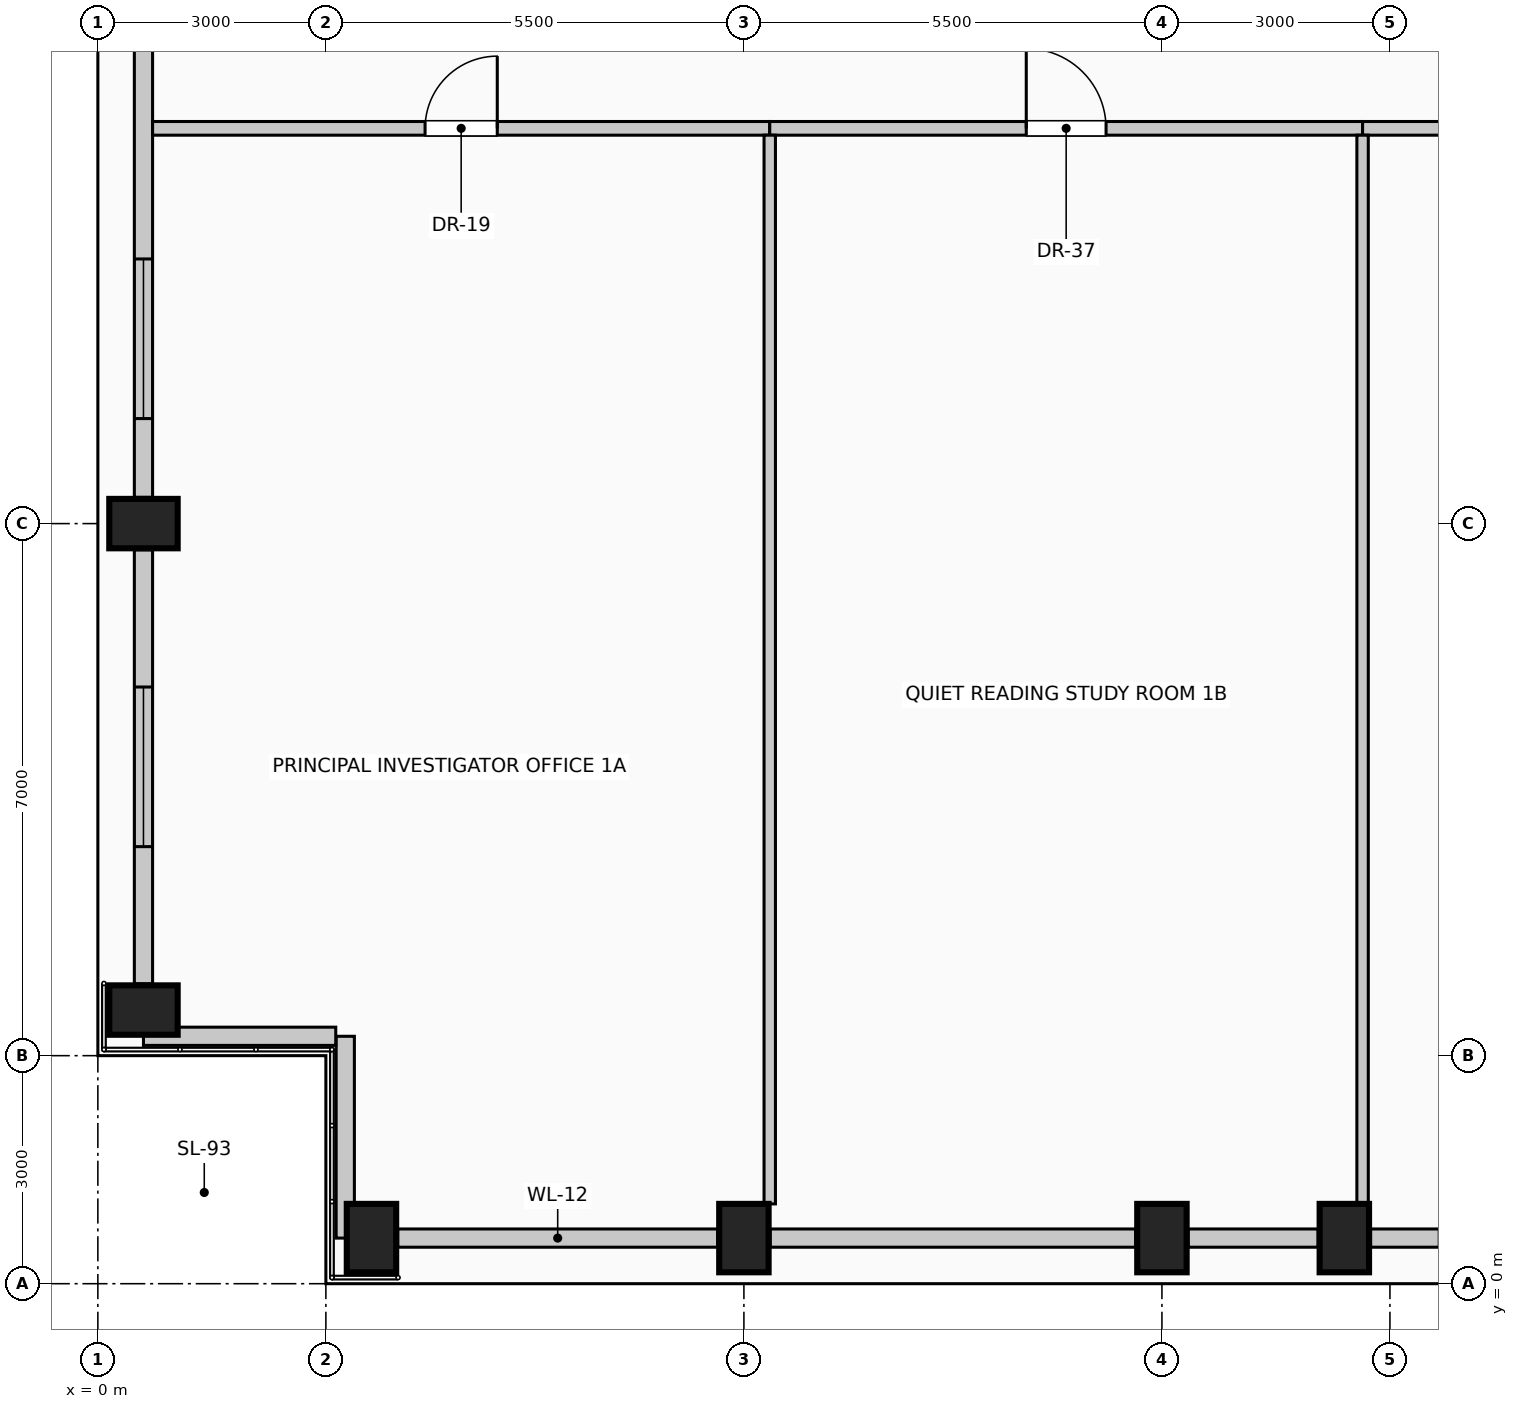
"""IFC4 building model, lengths in metres.
Left out: names, types, materials, properties, quantities, classifications, styles, units other than length and angle.
Written with IfcOpenShell. Run it as: python <this file> out.ifc"""

import sys

from ifc_helpers import new_model, si_unit, direction, frame, frame_2d, origin, origin_2d, place, context, subcontext, project, spatial, rectangle, extrude, element, fill, save


model = new_model("IFC4")
c1 = context("Model", 3, precision=1e-05, world=origin(), true_north=direction((0.0, 1.0)))
c2 = subcontext(c1, "Body", "Model", "MODEL_VIEW")
j1 = project(units=[si_unit("LENGTHUNIT", "METRE"), si_unit("PLANEANGLEUNIT", "RADIAN")], contexts=[c1])
p1 = place(None, origin())
s1 = spatial("IfcSite", under=j1, at=p1, CompositionType="ELEMENT")
p2 = place(p1, origin())
s2 = spatial("IfcBuilding", under=s1, at=p2, CompositionType="ELEMENT")
p3 = place(p2, frame((0.0, 0.0, 293.0)))
s3 = spatial("IfcBuildingStorey", under=s2, at=p3, CompositionType="ELEMENT", Elevation=293.0)
for number, where, z_axis, x_axis in (
    (1, (3.6, 0.6, 0.0), (0.0, 0.0, 1.0), (1.0, 0.0, 0.0)),
    (2, (8.5, 0.6, 0.0), (0.0, 0.0, 1.0), (1.0, 0.0, 0.0)),
    (3, (14.0, 0.6, 0.0), (0.0, 0.0, 1.0), (1.0, 0.0, 0.0)),
    (4, (16.4, 0.6, 0.0), (0.0, 0.0, 1.0), (1.0, 0.0, 0.0)),
    (5, (0.6, 3.6, 0.0), (0.0, 0.0, 1.0), (0.0, 1.0, 0.0)),
    (6, (0.6, 10.0, 0.0), (0.0, 0.0, 1.0), (0.0, 1.0, 0.0)),
):
    element("IfcColumn", number, at=place(p3, frame(where, z_axis=z_axis, x_axis=x_axis)), inside=s3, PredefinedType="COLUMN", context=c2, shape_type="SweptSolid", body=[
        extrude(rectangle(XDim=0.65, YDim=0.9, at=origin_2d()), origin(), (0.0, 0.0, 1.0), 4.0),
    ])
p4 = place(p3, frame((8.155, 0.6, 0.0), z_axis=(0.0, 0.0, 1.0), x_axis=(-1.0, 0.0, 0.0)))
e7 = element("IfcWall", 7, at=p4, inside=s3, PredefinedType="SOLIDWALL", context=c2, shape_type="SweptSolid", body=[
    extrude(rectangle(XDim=4.21, YDim=0.24, at=frame_2d((2.105, 0.0))), origin(), (0.0, 0.0, 1.0), 3.025),
])
p5 = place(p3, frame((13.655, 0.6, 0.0), z_axis=(0.0, 0.0, 1.0), x_axis=(-1.0, 0.0, 0.0)))
e8 = element("IfcWall", 8, at=p5, inside=s3, PredefinedType="SOLIDWALL", context=c2, shape_type="SweptSolid", body=[
    extrude(rectangle(XDim=4.81, YDim=0.24, at=frame_2d((2.405, 0.0))), origin(), (0.0, 0.0, 1.0), 3.025),
])
p6 = place(p3, frame((16.055, 0.6, 0.0), z_axis=(0.0, 0.0, 1.0), x_axis=(-1.0, 0.0, 0.0)))
e9 = element("IfcWall", 9, at=p6, inside=s3, PredefinedType="SOLIDWALL", context=c2, shape_type="SweptSolid", body=[
    extrude(rectangle(XDim=1.71, YDim=0.24, at=frame_2d((0.855, 0.0))), origin(), (0.0, 0.0, 1.0), 3.025),
])
p7 = place(p3, frame((23.655, 0.6, 0.0), z_axis=(0.0, 0.0, 1.0), x_axis=(-1.0, 0.0, 0.0)))
e10 = element("IfcWall", 10, at=p7, inside=s3, PredefinedType="SOLIDWALL", context=c2, shape_type="SweptSolid", body=[
    extrude(rectangle(XDim=6.91, YDim=0.24, at=frame_2d((3.455, 0.0))), origin(), (0.0, 0.0, 1.0), 3.025),
])
p8 = place(p7, frame((3.907, 0.0, 0.35)))
e11 = element("IfcOpeningElement", 11, at=p8, cuts=e10, PredefinedType="OPENING", context=c2, shape_type="SweptSolid", body=[
    extrude(rectangle(XDim=2.1, YDim=2.2, at=frame_2d((1.05, 1.1))), frame((0.0, 0.13, 0.0), z_axis=(0.0, -1.0, 0.0), x_axis=(1.0, 0.0, 0.0)), (0.0, 0.0, 1.0), 0.26),
])
p9 = place(p3, frame((0.6, 3.945, 0.0), z_axis=(0.0, 0.0, 1.0), x_axis=(0.0, 1.0, 0.0)))
e12 = element("IfcWall", 12, at=p9, inside=s3, PredefinedType="SOLIDWALL", context=c2, shape_type="SweptSolid", body=[
    extrude(rectangle(XDim=5.71, YDim=0.24, at=frame_2d((2.855, 0.0))), origin(), (0.0, 0.0, 1.0), 3.025),
])
p10 = place(p9, frame((1.805, 0.0, 0.35)))
e13 = element("IfcOpeningElement", 13, at=p10, cuts=e12, PredefinedType="OPENING", context=c2, shape_type="SweptSolid", body=[
    extrude(rectangle(XDim=2.1, YDim=2.2, at=frame_2d((1.05, 1.1))), frame((0.0, 0.13, 0.0), z_axis=(0.0, -1.0, 0.0), x_axis=(1.0, 0.0, 0.0)), (0.0, 0.0, 1.0), 0.26),
])
p11 = place(p3, frame((0.6, 10.345, 0.0), z_axis=(0.0, 0.0, 1.0), x_axis=(0.0, 1.0, 0.0)))
e14 = element("IfcWall", 14, at=p11, inside=s3, PredefinedType="SOLIDWALL", context=c2, shape_type="SweptSolid", body=[
    extrude(rectangle(XDim=7.31, YDim=0.24, at=frame_2d((3.655, 0.0))), origin(), (0.0, 0.0, 1.0), 3.025),
])
p12 = place(p11, frame((1.037, 0.0, 0.35)))
e15 = element("IfcOpeningElement", 15, at=p12, cuts=e14, PredefinedType="OPENING", context=c2, shape_type="SweptSolid", body=[
    extrude(rectangle(XDim=2.1, YDim=2.2, at=frame_2d((1.05, 1.1))), frame((0.0, 0.13, 0.0), z_axis=(0.0, -1.0, 0.0), x_axis=(1.0, 0.0, 0.0)), (0.0, 0.0, 1.0), 0.26),
])
p13 = place(p3, frame((3.255, 0.6, 0.0), z_axis=(0.0, 0.0, 1.0), x_axis=(0.0, 1.0, 0.0)))
e16 = element("IfcWall", 16, at=p13, inside=s3, PredefinedType="SOLIDWALL", context=c2, shape_type="SweptSolid", body=[
    extrude(rectangle(XDim=2.655, YDim=0.24, at=frame_2d((1.327, 0.0))), origin(), (0.0, 0.0, 1.0), 3.775),
])
p14 = place(p3, frame((3.13, 3.255, 0.0), z_axis=(0.0, 0.0, 1.0), x_axis=(-1.0, 0.0, 0.0)))
e17 = element("IfcWall", 17, at=p14, inside=s3, PredefinedType="SOLIDWALL", context=c2, shape_type="SweptSolid", body=[
    extrude(rectangle(XDim=2.53, YDim=0.24, at=frame_2d((1.265, 0.0))), origin(), (0.0, 0.0, 1.0), 3.775),
])
p15 = place(p3, frame((0.72, 15.2, 0.0), z_axis=(0.0, 0.0, 1.0), x_axis=(1.0, 0.0, 0.0)))
e18 = element("IfcWall", 18, at=p15, inside=s3, PredefinedType="PARTITIONING", context=c2, shape_type="SweptSolid", body=[
    extrude(rectangle(XDim=8.12, YDim=0.18, at=frame_2d((4.06, 0.0))), origin(), (0.0, 0.0, 1.0), 3.775),
])
p16 = place(p15, frame((3.585, 0.0, 0.0)))
e19 = element("IfcOpeningElement", 19, at=p16, cuts=e18, PredefinedType="OPENING", context=c2, shape_type="SweptSolid", body=[
    extrude(rectangle(XDim=0.95, YDim=2.15, at=frame_2d((0.475, 1.075))), frame((0.0, 0.1, 0.0), z_axis=(0.0, -1.0, 0.0), x_axis=(1.0, 0.0, 0.0)), (0.0, 0.0, 1.0), 0.2),
])
p17 = place(p3, frame((8.84, 15.2, 0.0), z_axis=(0.0, 0.0, 1.0), x_axis=(1.0, 0.0, 0.0)))
e20 = element("IfcWall", 20, at=p17, inside=s3, PredefinedType="PARTITIONING", context=c2, shape_type="SweptSolid", body=[
    extrude(rectangle(XDim=7.8, YDim=0.18, at=frame_2d((3.9, 0.0))), origin(), (0.0, 0.0, 1.0), 3.775),
])
p18 = place(p17, frame((3.375, 0.0, 0.0)))
e21 = element("IfcOpeningElement", 21, at=p18, cuts=e20, PredefinedType="OPENING", context=c2, shape_type="SweptSolid", body=[
    extrude(rectangle(XDim=1.05, YDim=2.15, at=frame_2d((0.525, 1.075))), frame((0.0, 0.1, 0.0), z_axis=(0.0, -1.0, 0.0), x_axis=(1.0, 0.0, 0.0)), (0.0, 0.0, 1.0), 0.2),
])
p19 = place(p3, frame((16.64, 15.2, 0.0), z_axis=(0.0, 0.0, 1.0), x_axis=(1.0, 0.0, 0.0)))
e22 = element("IfcWall", 22, at=p19, inside=s3, PredefinedType="PARTITIONING", context=c2, shape_type="SweptSolid", body=[
    extrude(rectangle(XDim=6.46, YDim=0.18, at=frame_2d((3.23, 0.0))), origin(), (0.0, 0.0, 1.0), 3.775),
])
p20 = place(p19, frame((2.755, 0.0, 0.0)))
e23 = element("IfcOpeningElement", 23, at=p20, cuts=e22, PredefinedType="OPENING", context=c2, shape_type="SweptSolid", body=[
    extrude(rectangle(XDim=0.95, YDim=2.15, at=frame_2d((0.475, 1.075))), frame((0.0, 0.1, 0.0), z_axis=(0.0, -1.0, 0.0), x_axis=(1.0, 0.0, 0.0)), (0.0, 0.0, 1.0), 0.2),
])
p21 = place(p3, frame((8.84, 1.05, 0.0), z_axis=(0.0, 0.0, 1.0), x_axis=(0.0, 1.0, 0.0)))
e24 = element("IfcWall", 24, at=p21, inside=s3, PredefinedType="PARTITIONING", context=c2, shape_type="SweptSolid", body=[
    extrude(rectangle(XDim=14.06, YDim=0.15, at=frame_2d((7.03, 0.0))), origin(), (0.0, 0.0, 1.0), 3.775),
])
p22 = place(p3, frame((16.64, 1.05, 0.0), z_axis=(0.0, 0.0, 1.0), x_axis=(0.0, 1.0, 0.0)))
e25 = element("IfcWall", 25, at=p22, inside=s3, PredefinedType="PARTITIONING", context=c2, shape_type="SweptSolid", body=[
    extrude(rectangle(XDim=14.06, YDim=0.15, at=frame_2d((7.03, 0.0))), origin(), (0.0, 0.0, 1.0), 3.27),
])
p23 = place(p10, origin())
e26 = element("IfcWindow", 26, at=p23, inside=s3, PartitioningType="SINGLE_PANEL", PredefinedType="WINDOW", context=c2, shape_type="SweptSolid", body=[
    extrude(rectangle(XDim=2.1, YDim=2.2, at=frame_2d((1.05, 1.1))), frame((0.0, 0.03, 0.0), z_axis=(0.0, -1.0, 0.0), x_axis=(1.0, 0.0, 0.0)), (0.0, 0.0, 1.0), 0.06),
])
fill(e13, e26)
p24 = place(p12, origin())
e27 = element("IfcWindow", 27, at=p24, inside=s3, PartitioningType="SINGLE_PANEL", PredefinedType="WINDOW", context=c2, shape_type="SweptSolid", body=[
    extrude(rectangle(XDim=2.1, YDim=2.2, at=frame_2d((1.05, 1.1))), frame((0.0, 0.03, 0.0), z_axis=(0.0, -1.0, 0.0), x_axis=(1.0, 0.0, 0.0)), (0.0, 0.0, 1.0), 0.06),
])
fill(e15, e27)
p25 = place(p16, origin())
e28 = element("IfcDoor", 28, at=p25, inside=s3, OperationType="SINGLE_SWING_RIGHT", PredefinedType="DOOR", context=c2, shape_type="SweptSolid", body=[
    extrude(rectangle(XDim=0.95, YDim=2.15, at=frame_2d((0.475, 1.075))), frame((0.0, 0.025, 0.0), z_axis=(0.0, -1.0, 0.0), x_axis=(1.0, 0.0, 0.0)), (0.0, 0.0, 1.0), 0.05),
])
fill(e19, e28)
p26 = place(p18, origin())
e29 = element("IfcDoor", 29, at=p26, inside=s3, OperationType="SINGLE_SWING_LEFT", PredefinedType="DOOR", context=c2, shape_type="SweptSolid", body=[
    extrude(rectangle(XDim=1.05, YDim=2.15, at=frame_2d((0.525, 1.075))), frame((0.0, 0.025, 0.0), z_axis=(0.0, -1.0, 0.0), x_axis=(1.0, 0.0, 0.0)), (0.0, 0.0, 1.0), 0.05),
])
fill(e21, e29)
save(model, sys.argv[1])
